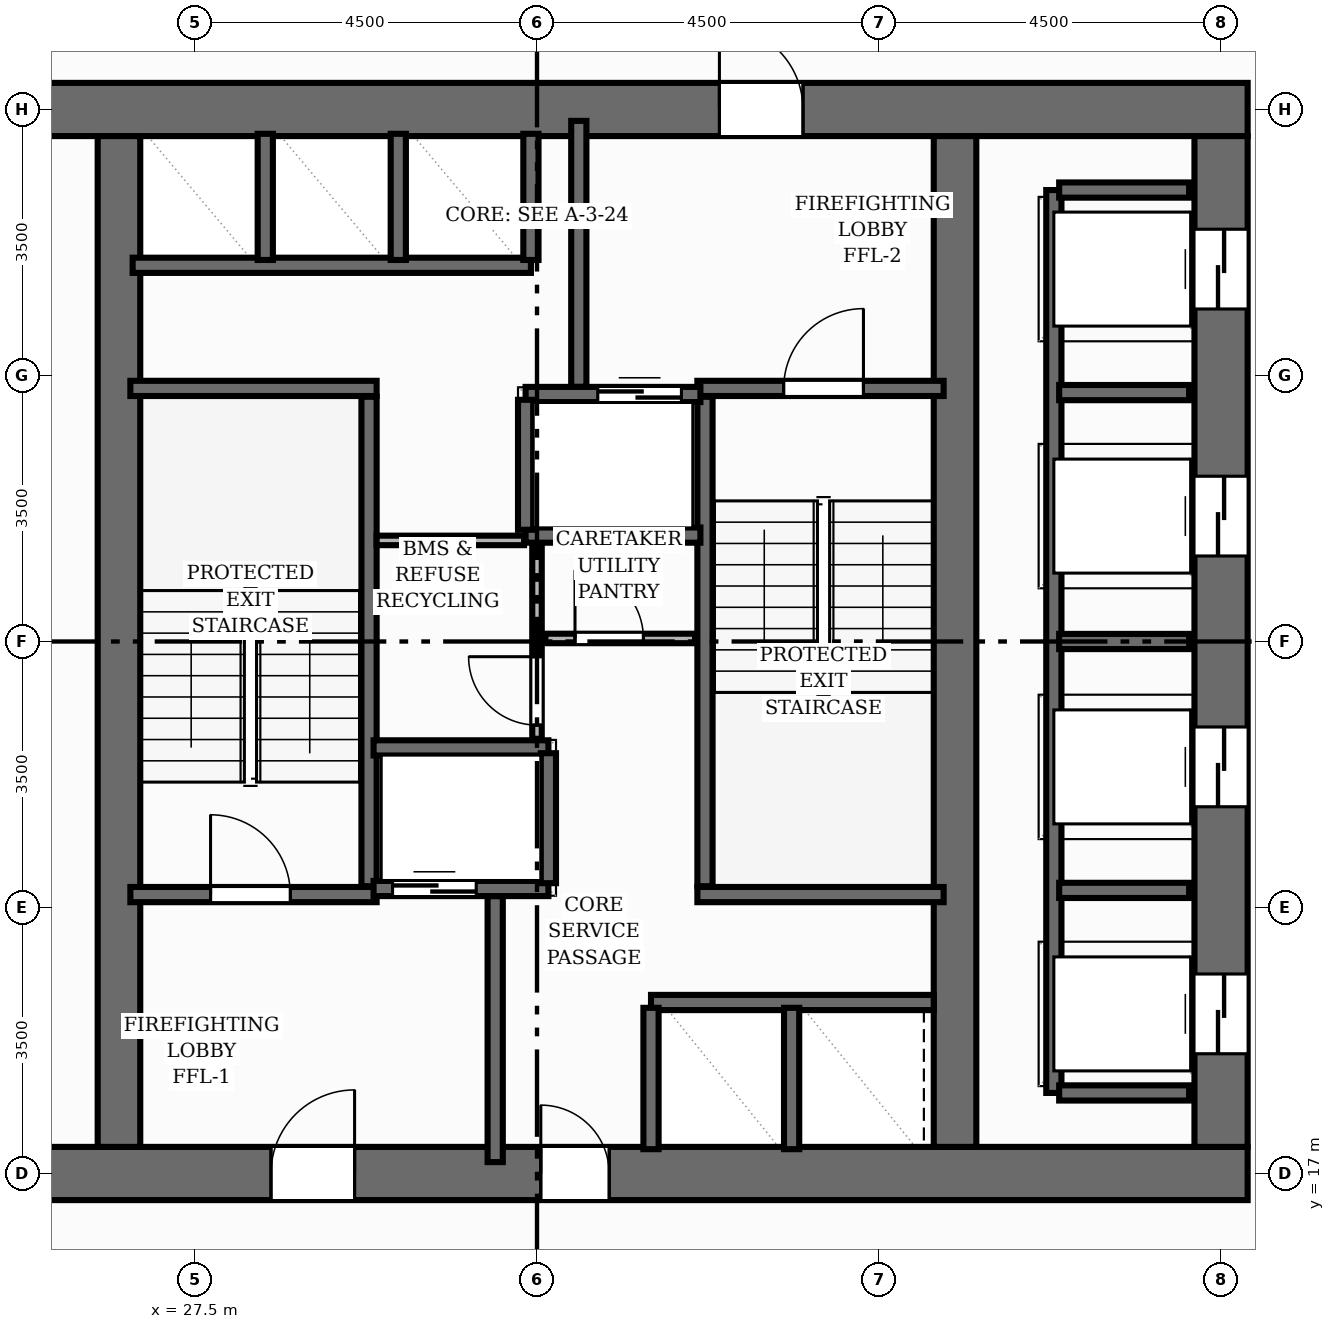
"""IFC4 building model, lengths in metres.
Left out: names, types, materials, properties, quantities, classifications, styles, units other than length and angle.
Written with IfcOpenShell. Run it as: python <this file> out.ifc"""

import sys

from ifc_helpers import new_model, si_unit, direction, frame, frame_2d, origin, place, context, subcontext, project, spatial, rectangle, extrude, element, fill, save


model = new_model("IFC4")
c1 = context("Model", 3, precision=1e-05, world=origin(), true_north=direction((0.0, 1.0)))
c2 = subcontext(c1, "Body", "Model", "MODEL_VIEW")
j1 = project(units=[si_unit("LENGTHUNIT", "METRE"), si_unit("PLANEANGLEUNIT", "RADIAN")], contexts=[c1])
p1 = place(None, origin())
s1 = spatial("IfcSite", under=j1, at=p1, CompositionType="ELEMENT")
p2 = place(p1, origin())
s2 = spatial("IfcBuilding", under=s1, at=p2, CompositionType="ELEMENT")
p3 = place(p2, frame((0.0, 0.0, 93.28)))
s3 = spatial("IfcBuildingStorey", under=s2, at=p3, CompositionType="ELEMENT", Elevation=93.28)
p4 = place(p3, frame((22.65, 17.0, 0.0), z_axis=(0.0, 0.0, 1.0), x_axis=(1.0, 0.0, 0.0)))
e1 = element("IfcWall", 1, at=p4, inside=s3, PredefinedType="SHEAR", context=c2, shape_type="SweptSolid", body=[
    extrude(rectangle(XDim=18.7, YDim=0.7, at=frame_2d((9.35, 0.0))), origin(), (0.0, 0.0, 1.0), 3.2),
])
p5 = place(p4, frame((5.85, 0.0, 0.0)))
e2 = element("IfcOpeningElement", 2, at=p5, cuts=e1, PredefinedType="OPENING", context=c2, shape_type="SweptSolid", body=[
    extrude(rectangle(XDim=1.1, YDim=2.15, at=frame_2d((0.55, 1.075))), frame((0.0, 0.36, 0.0), z_axis=(0.0, -1.0, 0.0), x_axis=(1.0, 0.0, 0.0)), (0.0, 0.0, 1.0), 0.72),
])
p6 = place(p4, frame((9.4, 0.0, 0.0)))
e3 = element("IfcOpeningElement", 3, at=p6, cuts=e1, PredefinedType="OPENING", context=c2, shape_type="SweptSolid", body=[
    extrude(rectangle(XDim=0.9, YDim=2.1, at=frame_2d((0.45, 1.05))), frame((0.0, 0.36, 0.0), z_axis=(0.0, -1.0, 0.0), x_axis=(1.0, 0.0, 0.0)), (0.0, 0.0, 1.0), 0.72),
])
p7 = place(p3, frame((22.65, 31.0, 0.0), z_axis=(0.0, 0.0, 1.0), x_axis=(1.0, 0.0, 0.0)))
e4 = element("IfcWall", 4, at=p7, inside=s3, PredefinedType="SHEAR", context=c2, shape_type="SweptSolid", body=[
    extrude(rectangle(XDim=18.7, YDim=0.7, at=frame_2d((9.35, 0.0))), origin(), (0.0, 0.0, 1.0), 3.2),
])
p8 = place(p7, frame((11.75, 0.0, 0.0)))
e5 = element("IfcOpeningElement", 5, at=p8, cuts=e4, PredefinedType="OPENING", context=c2, shape_type="SweptSolid", body=[
    extrude(rectangle(XDim=1.1, YDim=2.15, at=frame_2d((0.55, 1.075))), frame((0.0, 0.36, 0.0), z_axis=(0.0, -1.0, 0.0), x_axis=(1.0, 0.0, 0.0)), (0.0, 0.0, 1.0), 0.72),
])
p9 = place(p3, frame((41.0, 17.35, 0.0), z_axis=(0.0, 0.0, 1.0), x_axis=(0.0, 1.0, 0.0)))
e6 = element("IfcWall", 6, at=p9, inside=s3, PredefinedType="SHEAR", context=c2, shape_type="SweptSolid", body=[
    extrude(rectangle(XDim=13.3, YDim=0.7, at=frame_2d((6.65, 0.0))), origin(), (0.0, 0.0, 1.0), 3.2),
])
p10 = place(p9, frame((1.225, 0.0, 0.0)))
e7 = element("IfcOpeningElement", 7, at=p10, cuts=e6, PredefinedType="OPENING", context=c2, shape_type="SweptSolid", body=[
    extrude(rectangle(XDim=1.05, YDim=2.15, at=frame_2d((0.525, 1.075))), frame((0.0, 0.36, 0.0), z_axis=(0.0, -1.0, 0.0), x_axis=(1.0, 0.0, 0.0)), (0.0, 0.0, 1.0), 0.72),
])
p11 = place(p9, frame((4.475, 0.0, 0.0)))
e8 = element("IfcOpeningElement", 8, at=p11, cuts=e6, PredefinedType="OPENING", context=c2, shape_type="SweptSolid", body=[
    extrude(rectangle(XDim=1.05, YDim=2.15, at=frame_2d((0.525, 1.075))), frame((0.0, 0.36, 0.0), z_axis=(0.0, -1.0, 0.0), x_axis=(1.0, 0.0, 0.0)), (0.0, 0.0, 1.0), 0.72),
])
p12 = place(p9, frame((7.775, 0.0, 0.0)))
e9 = element("IfcOpeningElement", 9, at=p12, cuts=e6, PredefinedType="OPENING", context=c2, shape_type="SweptSolid", body=[
    extrude(rectangle(XDim=1.05, YDim=2.15, at=frame_2d((0.525, 1.075))), frame((0.0, 0.36, 0.0), z_axis=(0.0, -1.0, 0.0), x_axis=(1.0, 0.0, 0.0)), (0.0, 0.0, 1.0), 0.72),
])
p13 = place(p9, frame((11.025, 0.0, 0.0)))
e10 = element("IfcOpeningElement", 10, at=p13, cuts=e6, PredefinedType="OPENING", context=c2, shape_type="SweptSolid", body=[
    extrude(rectangle(XDim=1.05, YDim=2.15, at=frame_2d((0.525, 1.075))), frame((0.0, 0.36, 0.0), z_axis=(0.0, -1.0, 0.0), x_axis=(1.0, 0.0, 0.0)), (0.0, 0.0, 1.0), 0.72),
])
for number, where, z_axis, x_axis in (
    (11, (26.5, 17.35, 0.0), (0.0, 0.0, 1.0), (0.0, 1.0, 0.0)),
    (12, (37.5, 17.35, 0.0), (0.0, 0.0, 1.0), (0.0, 1.0, 0.0)),
):
    element("IfcWall", number, at=place(p3, frame(where, z_axis=z_axis, x_axis=x_axis)), inside=s3, PredefinedType="SHEAR", context=c2, shape_type="SweptSolid", body=[
        extrude(rectangle(XDim=13.3, YDim=0.56, at=frame_2d((6.65, 0.0))), origin(), (0.0, 0.0, 1.0), 3.2),
    ])
p14 = place(p3, frame((29.79, 20.78, 0.0), z_axis=(0.0, 0.0, 1.0), x_axis=(0.0, 1.0, 0.0)))
e13 = element("IfcWall", 13, at=p14, inside=s3, PredefinedType="SHEAR", context=c2, shape_type="SweptSolid", body=[
    extrude(rectangle(XDim=6.44, YDim=0.2, at=frame_2d((3.22, 0.0))), origin(), (0.0, 0.0, 1.0), 3.2),
])
p15 = place(p3, frame((26.65, 27.33, 0.0), z_axis=(0.0, 0.0, 1.0), x_axis=(1.0, 0.0, 0.0)))
e14 = element("IfcWall", 14, at=p15, inside=s3, PredefinedType="SHEAR", context=c2, shape_type="SweptSolid", body=[
    extrude(rectangle(XDim=3.24, YDim=0.2, at=frame_2d((1.62, 0.0))), origin(), (0.0, 0.0, 1.0), 3.2),
])
p16 = place(p3, frame((26.65, 20.67, 0.0), z_axis=(0.0, 0.0, 1.0), x_axis=(1.0, 0.0, 0.0)))
e15 = element("IfcWall", 15, at=p16, inside=s3, PredefinedType="SHEAR", context=c2, shape_type="SweptSolid", body=[
    extrude(rectangle(XDim=3.24, YDim=0.2, at=frame_2d((1.62, 0.0))), origin(), (0.0, 0.0, 1.0), 3.2),
])
p17 = place(p16, frame((1.055, 0.0, 0.0)))
e16 = element("IfcOpeningElement", 16, at=p17, cuts=e15, PredefinedType="OPENING", context=c2, shape_type="SweptSolid", body=[
    extrude(rectangle(XDim=1.05, YDim=2.15, at=frame_2d((0.525, 1.075))), frame((0.0, 0.11, 0.0), z_axis=(0.0, -1.0, 0.0), x_axis=(1.0, 0.0, 0.0)), (0.0, 0.0, 1.0), 0.22),
])
p18 = place(p3, frame((34.21, 20.78, 0.0), z_axis=(0.0, 0.0, 1.0), x_axis=(0.0, 1.0, 0.0)))
e17 = element("IfcWall", 17, at=p18, inside=s3, PredefinedType="SHEAR", context=c2, shape_type="SweptSolid", body=[
    extrude(rectangle(XDim=6.44, YDim=0.2, at=frame_2d((3.22, 0.0))), origin(), (0.0, 0.0, 1.0), 3.2),
])
p19 = place(p3, frame((34.11, 20.67, 0.0), z_axis=(0.0, 0.0, 1.0), x_axis=(1.0, 0.0, 0.0)))
e18 = element("IfcWall", 18, at=p19, inside=s3, PredefinedType="SHEAR", context=c2, shape_type="SweptSolid", body=[
    extrude(rectangle(XDim=3.24, YDim=0.2, at=frame_2d((1.62, 0.0))), origin(), (0.0, 0.0, 1.0), 3.2),
])
p20 = place(p3, frame((34.11, 27.33, 0.0), z_axis=(0.0, 0.0, 1.0), x_axis=(1.0, 0.0, 0.0)))
e19 = element("IfcWall", 19, at=p20, inside=s3, PredefinedType="SHEAR", context=c2, shape_type="SweptSolid", body=[
    extrude(rectangle(XDim=3.24, YDim=0.2, at=frame_2d((1.62, 0.0))), origin(), (0.0, 0.0, 1.0), 3.2),
])
p21 = place(p20, frame((1.135, 0.0, 0.0)))
e20 = element("IfcOpeningElement", 20, at=p21, cuts=e19, PredefinedType="OPENING", context=c2, shape_type="SweptSolid", body=[
    extrude(rectangle(XDim=1.05, YDim=2.15, at=frame_2d((0.525, 1.075))), frame((0.0, 0.11, 0.0), z_axis=(0.0, -1.0, 0.0), x_axis=(1.0, 0.0, 0.0)), (0.0, 0.0, 1.0), 0.22),
])
for number, where, z_axis, x_axis in (
    (21, (31.45, 17.15, 0.0), (0.0, 0.0, 1.0), (0.0, 1.0, 0.0)),
    (22, (32.55, 27.35, 0.0), (0.0, 0.0, 1.0), (0.0, 1.0, 0.0)),
):
    element("IfcWall", number, at=place(p3, frame(where, z_axis=z_axis, x_axis=x_axis)), inside=s3, PredefinedType="SHEAR", context=c2, shape_type="SweptSolid", body=[
        extrude(rectangle(XDim=3.5, YDim=0.2, at=frame_2d((1.75, 0.0))), origin(), (0.0, 0.0, 1.0), 3.2),
    ])
p22 = place(p3, frame((29.85, 20.75, 0.0), z_axis=(0.0, 0.0, 1.0), x_axis=(1.0, 0.0, 0.0)))
e23 = element("IfcWall", 23, at=p22, inside=s3, PredefinedType="SHEAR", context=c2, shape_type="SweptSolid", body=[
    extrude(rectangle(XDim=2.3, YDim=0.2, at=frame_2d((1.15, 0.0))), origin(), (0.0, 0.0, 1.0), 3.2),
])
p23 = place(p22, frame((0.25, 0.0, 0.0)))
e24 = element("IfcOpeningElement", 24, at=p23, cuts=e23, PredefinedType="OPENING", context=c2, shape_type="SweptSolid", body=[
    extrude(rectangle(XDim=1.1, YDim=2.15, at=frame_2d((0.55, 1.075))), frame((0.0, 0.11, 0.0), z_axis=(0.0, -1.0, 0.0), x_axis=(1.0, 0.0, 0.0)), (0.0, 0.0, 1.0), 0.22),
])
p24 = place(p3, frame((29.85, 22.6, 0.0), z_axis=(0.0, 0.0, 1.0), x_axis=(1.0, 0.0, 0.0)))
e25 = element("IfcWall", 25, at=p24, inside=s3, PredefinedType="SHEAR", context=c2, shape_type="SweptSolid", body=[
    extrude(rectangle(XDim=2.3, YDim=0.2, at=frame_2d((1.15, 0.0))), origin(), (0.0, 0.0, 1.0), 3.2),
])
p25 = place(p3, frame((32.15, 20.82, 0.0), z_axis=(0.0, 0.0, 1.0), x_axis=(0.0, 1.0, 0.0)))
e26 = element("IfcWall", 26, at=p25, inside=s3, PredefinedType="SHEAR", context=c2, shape_type="SweptSolid", body=[
    extrude(rectangle(XDim=1.71, YDim=0.2, at=frame_2d((0.855, 0.0))), origin(), (0.0, 0.0, 1.0), 3.2),
])
p26 = place(p3, frame((31.85, 27.25, 0.0), z_axis=(0.0, 0.0, 1.0), x_axis=(1.0, 0.0, 0.0)))
e27 = element("IfcWall", 27, at=p26, inside=s3, PredefinedType="SHEAR", context=c2, shape_type="SweptSolid", body=[
    extrude(rectangle(XDim=2.3, YDim=0.2, at=frame_2d((1.15, 0.0))), origin(), (0.0, 0.0, 1.0), 3.2),
])
p27 = place(p26, frame((0.95, 0.0, 0.0)))
e28 = element("IfcOpeningElement", 28, at=p27, cuts=e27, PredefinedType="OPENING", context=c2, shape_type="SweptSolid", body=[
    extrude(rectangle(XDim=1.1, YDim=2.15, at=frame_2d((0.55, 1.075))), frame((0.0, 0.11, 0.0), z_axis=(0.0, -1.0, 0.0), x_axis=(1.0, 0.0, 0.0)), (0.0, 0.0, 1.0), 0.22),
])
p28 = place(p3, frame((31.85, 25.4, 0.0), z_axis=(0.0, 0.0, 1.0), x_axis=(1.0, 0.0, 0.0)))
e29 = element("IfcWall", 29, at=p28, inside=s3, PredefinedType="SHEAR", context=c2, shape_type="SweptSolid", body=[
    extrude(rectangle(XDim=2.3, YDim=0.2, at=frame_2d((1.15, 0.0))), origin(), (0.0, 0.0, 1.0), 3.2),
])
p29 = place(p3, frame((31.85, 25.47, 0.0), z_axis=(0.0, 0.0, 1.0), x_axis=(0.0, 1.0, 0.0)))
e30 = element("IfcWall", 30, at=p29, inside=s3, PredefinedType="SHEAR", context=c2, shape_type="SweptSolid", body=[
    extrude(rectangle(XDim=1.71, YDim=0.2, at=frame_2d((0.855, 0.0))), origin(), (0.0, 0.0, 1.0), 3.2),
])
p30 = place(p3, frame((38.8, 18.06, 0.0), z_axis=(0.0, 0.0, 1.0), x_axis=(0.0, 1.0, 0.0)))
e31 = element("IfcWall", 31, at=p30, inside=s3, PredefinedType="SHEAR", context=c2, shape_type="SweptSolid", body=[
    extrude(rectangle(XDim=11.88, YDim=0.2, at=frame_2d((5.94, 0.0))), origin(), (0.0, 0.0, 1.0), 3.2),
])
for number, where, z_axis, x_axis in (
    (32, (38.87, 18.06, 0.0), (0.0, 0.0, 1.0), (1.0, 0.0, 0.0)),
    (33, (38.87, 29.94, 0.0), (0.0, 0.0, 1.0), (1.0, 0.0, 0.0)),
    (34, (38.87, 20.725, 0.0), (0.0, 0.0, 1.0), (1.0, 0.0, 0.0)),
    (35, (38.87, 24.0, 0.0), (0.0, 0.0, 1.0), (1.0, 0.0, 0.0)),
    (36, (38.87, 27.275, 0.0), (0.0, 0.0, 1.0), (1.0, 0.0, 0.0)),
):
    element("IfcWall", number, at=place(p3, frame(where, z_axis=z_axis, x_axis=x_axis)), inside=s3, PredefinedType="SHEAR", context=c2, shape_type="SweptSolid", body=[
        extrude(rectangle(XDim=1.71, YDim=0.2, at=frame_2d((0.855, 0.0))), origin(), (0.0, 0.0, 1.0), 3.2),
    ])
p31 = place(p3, frame((26.68, 28.95, 0.0), z_axis=(0.0, 0.0, 1.0), x_axis=(1.0, 0.0, 0.0)))
e37 = element("IfcWall", 37, at=p31, inside=s3, PredefinedType="SHEAR", context=c2, shape_type="SweptSolid", body=[
    extrude(rectangle(XDim=5.24, YDim=0.2, at=frame_2d((2.62, 0.0))), origin(), (0.0, 0.0, 1.0), 3.2),
])
for number, where, z_axis, x_axis in (
    (38, (31.92, 29.02, 0.0), (0.0, 0.0, 1.0), (0.0, 1.0, 0.0)),
    (39, (28.425, 29.02, 0.0), (0.0, 0.0, 1.0), (0.0, 1.0, 0.0)),
    (40, (30.175, 29.02, 0.0), (0.0, 0.0, 1.0), (0.0, 1.0, 0.0)),
):
    element("IfcWall", number, at=place(p3, frame(where, z_axis=z_axis, x_axis=x_axis)), inside=s3, PredefinedType="SHEAR", context=c2, shape_type="SweptSolid", body=[
        extrude(rectangle(XDim=1.66, YDim=0.2, at=frame_2d((0.83, 0.0))), origin(), (0.0, 0.0, 1.0), 3.2),
    ])
p32 = place(p3, frame((33.5, 19.25, 0.0), z_axis=(0.0, 0.0, 1.0), x_axis=(1.0, 0.0, 0.0)))
e41 = element("IfcWall", 41, at=p32, inside=s3, PredefinedType="SHEAR", context=c2, shape_type="SweptSolid", body=[
    extrude(rectangle(XDim=3.72, YDim=0.2, at=frame_2d((1.86, 0.0))), origin(), (0.0, 0.0, 1.0), 3.2),
])
for number, where, z_axis, x_axis in (
    (42, (33.5, 17.32, 0.0), (0.0, 0.0, 1.0), (0.0, 1.0, 0.0)),
    (43, (35.35, 17.32, 0.0), (0.0, 0.0, 1.0), (0.0, 1.0, 0.0)),
):
    element("IfcWall", number, at=place(p3, frame(where, z_axis=z_axis, x_axis=x_axis)), inside=s3, PredefinedType="SHEAR", context=c2, shape_type="SweptSolid", body=[
        extrude(rectangle(XDim=1.86, YDim=0.2, at=frame_2d((0.93, 0.0))), origin(), (0.0, 0.0, 1.0), 3.2),
    ])
p33 = place(p3, frame((32.0, 22.72, 0.0), z_axis=(0.0, 0.0, 1.0), x_axis=(0.0, 1.0, 0.0)))
e44 = element("IfcWall", 44, at=p33, inside=s3, PredefinedType="PARTITIONING", context=c2, shape_type="SweptSolid", body=[
    extrude(rectangle(XDim=2.52, YDim=0.125, at=frame_2d((1.26, 0.0))), origin(), (0.0, 0.0, 1.0), 2.955),
])
p34 = place(p33, frame((0.18, 0.0, 0.0)))
e45 = element("IfcOpeningElement", 45, at=p34, cuts=e44, PredefinedType="OPENING", context=c2, shape_type="SweptSolid", body=[
    extrude(rectangle(XDim=0.9, YDim=2.1, at=frame_2d((0.45, 1.05))), frame((0.0, 0.073, 0.0), z_axis=(0.0, -1.0, 0.0), x_axis=(1.0, 0.0, 0.0)), (0.0, 0.0, 1.0), 0.145),
])
p35 = place(p3, frame((32.11, 24.04, 0.0), z_axis=(0.0, 0.0, 1.0), x_axis=(1.0, 0.0, 0.0)))
e46 = element("IfcWall", 46, at=p35, inside=s3, PredefinedType="PARTITIONING", context=c2, shape_type="SweptSolid", body=[
    extrude(rectangle(XDim=1.97, YDim=0.125, at=frame_2d((0.985, 0.0))), origin(), (0.0, 0.0, 1.0), 2.955),
])
p36 = place(p35, frame((0.39, 0.0, 0.0)))
e47 = element("IfcOpeningElement", 47, at=p36, cuts=e46, PredefinedType="OPENING", context=c2, shape_type="SweptSolid", body=[
    extrude(rectangle(XDim=0.9, YDim=2.1, at=frame_2d((0.45, 1.05))), frame((0.0, 0.073, 0.0), z_axis=(0.0, -1.0, 0.0), x_axis=(1.0, 0.0, 0.0)), (0.0, 0.0, 1.0), 0.145),
])
p37 = place(p3, frame((29.89, 25.33, 0.0), z_axis=(0.0, 0.0, 1.0), x_axis=(1.0, 0.0, 0.0)))
e48 = element("IfcWall", 48, at=p37, inside=s3, PredefinedType="PARTITIONING", context=c2, shape_type="SweptSolid", body=[
    extrude(rectangle(XDim=1.94, YDim=0.125, at=frame_2d((0.97, 0.0))), origin(), (0.0, 0.0, 1.0), 2.955),
])
p38 = place(p17, origin())
e49 = element("IfcDoor", 49, at=p38, inside=s3, OperationType="SINGLE_SWING_LEFT", PredefinedType="DOOR", context=c2, shape_type="SweptSolid", body=[
    extrude(rectangle(XDim=1.05, YDim=2.15, at=frame_2d((0.525, 1.075))), frame((0.0, 0.025, 0.0), z_axis=(0.0, -1.0, 0.0), x_axis=(1.0, 0.0, 0.0)), (0.0, 0.0, 1.0), 0.05),
])
fill(e16, e49)
p39 = place(p21, origin())
e50 = element("IfcDoor", 50, at=p39, inside=s3, OperationType="SINGLE_SWING_RIGHT", PredefinedType="DOOR", context=c2, shape_type="SweptSolid", body=[
    extrude(rectangle(XDim=1.05, YDim=2.15, at=frame_2d((0.525, 1.075))), frame((0.0, 0.025, 0.0), z_axis=(0.0, -1.0, 0.0), x_axis=(1.0, 0.0, 0.0)), (0.0, 0.0, 1.0), 0.05),
])
fill(e20, e50)
p40 = place(p5, origin())
e51 = element("IfcDoor", 51, at=p40, inside=s3, OperationType="SINGLE_SWING_RIGHT", PredefinedType="DOOR", context=c2, shape_type="SweptSolid", body=[
    extrude(rectangle(XDim=1.1, YDim=2.15, at=frame_2d((0.55, 1.075))), frame((0.0, 0.025, 0.0), z_axis=(0.0, -1.0, 0.0), x_axis=(1.0, 0.0, 0.0)), (0.0, 0.0, 1.0), 0.05),
])
fill(e2, e51)
p41 = place(p8, origin())
e52 = element("IfcDoor", 52, at=p41, inside=s3, OperationType="SINGLE_SWING_LEFT", PredefinedType="DOOR", context=c2, shape_type="SweptSolid", body=[
    extrude(rectangle(XDim=1.1, YDim=2.15, at=frame_2d((0.55, 1.075))), frame((0.0, 0.025, 0.0), z_axis=(0.0, -1.0, 0.0), x_axis=(1.0, 0.0, 0.0)), (0.0, 0.0, 1.0), 0.05),
])
fill(e5, e52)
p42 = place(p23, origin())
e53 = element("IfcDoor", 53, at=p42, inside=s3, OperationType="DOUBLE_DOOR_SLIDING", PredefinedType="DOOR", context=c2, shape_type="SweptSolid", body=[
    extrude(rectangle(XDim=1.1, YDim=2.15, at=frame_2d((0.55, 1.075))), frame((0.0, 0.025, 0.0), z_axis=(0.0, -1.0, 0.0), x_axis=(1.0, 0.0, 0.0)), (0.0, 0.0, 1.0), 0.05),
])
fill(e24, e53)
p43 = place(p27, origin())
e54 = element("IfcDoor", 54, at=p43, inside=s3, OperationType="DOUBLE_DOOR_SLIDING", PredefinedType="DOOR", context=c2, shape_type="SweptSolid", body=[
    extrude(rectangle(XDim=1.1, YDim=2.15, at=frame_2d((0.55, 1.075))), frame((0.0, 0.025, 0.0), z_axis=(0.0, -1.0, 0.0), x_axis=(1.0, 0.0, 0.0)), (0.0, 0.0, 1.0), 0.05),
])
fill(e28, e54)
p44 = place(p10, origin())
e55 = element("IfcDoor", 55, at=p44, inside=s3, OperationType="DOUBLE_DOOR_SLIDING", PredefinedType="DOOR", context=c2, shape_type="SweptSolid", body=[
    extrude(rectangle(XDim=1.05, YDim=2.15, at=frame_2d((0.525, 1.075))), frame((0.0, 0.025, 0.0), z_axis=(0.0, -1.0, 0.0), x_axis=(1.0, 0.0, 0.0)), (0.0, 0.0, 1.0), 0.05),
])
fill(e7, e55)
p45 = place(p11, origin())
e56 = element("IfcDoor", 56, at=p45, inside=s3, OperationType="DOUBLE_DOOR_SLIDING", PredefinedType="DOOR", context=c2, shape_type="SweptSolid", body=[
    extrude(rectangle(XDim=1.05, YDim=2.15, at=frame_2d((0.525, 1.075))), frame((0.0, 0.025, 0.0), z_axis=(0.0, -1.0, 0.0), x_axis=(1.0, 0.0, 0.0)), (0.0, 0.0, 1.0), 0.05),
])
fill(e8, e56)
p46 = place(p12, origin())
e57 = element("IfcDoor", 57, at=p46, inside=s3, OperationType="DOUBLE_DOOR_SLIDING", PredefinedType="DOOR", context=c2, shape_type="SweptSolid", body=[
    extrude(rectangle(XDim=1.05, YDim=2.15, at=frame_2d((0.525, 1.075))), frame((0.0, 0.025, 0.0), z_axis=(0.0, -1.0, 0.0), x_axis=(1.0, 0.0, 0.0)), (0.0, 0.0, 1.0), 0.05),
])
fill(e9, e57)
p47 = place(p13, origin())
e58 = element("IfcDoor", 58, at=p47, inside=s3, OperationType="DOUBLE_DOOR_SLIDING", PredefinedType="DOOR", context=c2, shape_type="SweptSolid", body=[
    extrude(rectangle(XDim=1.05, YDim=2.15, at=frame_2d((0.525, 1.075))), frame((0.0, 0.025, 0.0), z_axis=(0.0, -1.0, 0.0), x_axis=(1.0, 0.0, 0.0)), (0.0, 0.0, 1.0), 0.05),
])
fill(e10, e58)
p48 = place(p6, origin())
e59 = element("IfcDoor", 59, at=p48, inside=s3, OperationType="SINGLE_SWING_LEFT", PredefinedType="DOOR", context=c2, shape_type="SweptSolid", body=[
    extrude(rectangle(XDim=0.9, YDim=2.1, at=frame_2d((0.45, 1.05))), frame((0.0, 0.025, 0.0), z_axis=(0.0, -1.0, 0.0), x_axis=(1.0, 0.0, 0.0)), (0.0, 0.0, 1.0), 0.05),
])
fill(e3, e59)
p49 = place(p36, origin())
e60 = element("IfcDoor", 60, at=p49, inside=s3, OperationType="SINGLE_SWING_LEFT", PredefinedType="DOOR", context=c2, shape_type="SweptSolid", body=[
    extrude(rectangle(XDim=0.9, YDim=2.1, at=frame_2d((0.45, 1.05))), frame((0.0, 0.025, 0.0), z_axis=(0.0, -1.0, 0.0), x_axis=(1.0, 0.0, 0.0)), (0.0, 0.0, 1.0), 0.05),
])
fill(e47, e60)
p50 = place(p34, origin())
e61 = element("IfcDoor", 61, at=p50, inside=s3, OperationType="SINGLE_SWING_RIGHT", PredefinedType="DOOR", context=c2, shape_type="SweptSolid", body=[
    extrude(rectangle(XDim=0.9, YDim=2.1, at=frame_2d((0.45, 1.05))), frame((0.0, 0.025, 0.0), z_axis=(0.0, -1.0, 0.0), x_axis=(1.0, 0.0, 0.0)), (0.0, 0.0, 1.0), 0.05),
])
fill(e45, e61)
save(model, sys.argv[1])
